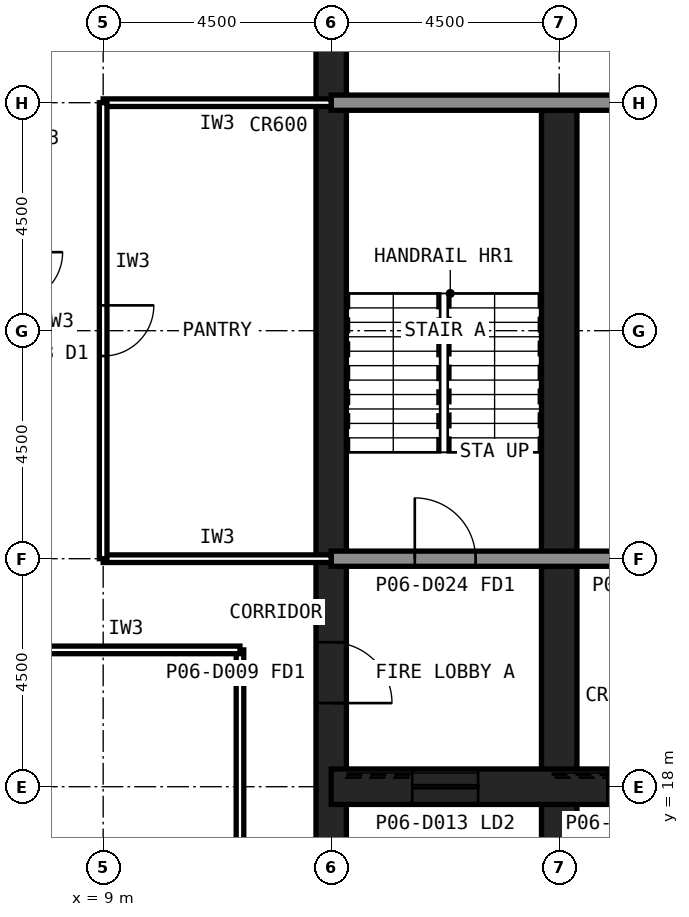
"""IFC4 building model, lengths in metres.
Left out: names, types, materials, properties, quantities, classifications, styles, units other than length and angle.
Written with IfcOpenShell. Run it as: python <this file> out.ifc"""

import sys

from ifc_helpers import new_model, si_unit, direction, frame, frame_2d, origin, place, context, subcontext, project, spatial, rectangle, extrude, element, fill, save


model = new_model("IFC4")
c1 = context("Model", 3, precision=1e-05, world=origin(), true_north=direction((0.0, 1.0)))
c2 = subcontext(c1, "Body", "Model", "MODEL_VIEW")
j1 = project(units=[si_unit("LENGTHUNIT", "METRE"), si_unit("PLANEANGLEUNIT", "RADIAN")], contexts=[c1])
p1 = place(None, origin())
s1 = spatial("IfcSite", under=j1, at=p1, CompositionType="ELEMENT")
p2 = place(p1, origin())
s2 = spatial("IfcBuilding", under=s1, at=p2, CompositionType="ELEMENT")
p3 = place(p2, frame((0.0, 0.0, 29.0)))
s3 = spatial("IfcBuildingStorey", under=s2, at=p3, CompositionType="ELEMENT", Elevation=29.0)
p4 = place(p3, frame((13.5, 40.5, 0.0), z_axis=(0.0, 0.0, 1.0), x_axis=(0.0, -1.0, 0.0)))
e1 = element("IfcWall", 1, at=p4, inside=s3, PredefinedType="SHEAR", context=c2, shape_type="SweptSolid", body=[
    extrude(rectangle(XDim=27.0, YDim=0.6, at=frame_2d((13.5, 0.0))), origin(), (0.0, 0.0, 1.0), 4.2),
])
p5 = place(p4, frame((19.65, 0.0, 0.0)))
e2 = element("IfcOpeningElement", 2, at=p5, cuts=e1, PredefinedType="OPENING", context=c2, shape_type="SweptSolid", body=[
    extrude(rectangle(XDim=1.2, YDim=2.1, at=frame_2d((0.6, 1.05))), frame((0.0, 0.31, 0.0), z_axis=(0.0, -1.0, 0.0), x_axis=(1.0, 0.0, 0.0)), (0.0, 0.0, 1.0), 0.62),
])
p6 = place(p4, frame((5.85, 0.0, 0.0)))
e3 = element("IfcOpeningElement", 3, at=p6, cuts=e1, PredefinedType="OPENING", context=c2, shape_type="SweptSolid", body=[
    extrude(rectangle(XDim=1.8, YDim=2.1, at=frame_2d((0.9, 1.05))), frame((0.0, 0.31, 0.0), z_axis=(0.0, -1.0, 0.0), x_axis=(1.0, 0.0, 0.0)), (0.0, 0.0, 1.0), 0.62),
])
p7 = place(p3, frame((18.0, 13.5, 0.0), z_axis=(0.0, 0.0, 1.0), x_axis=(0.0, 1.0, 0.0)))
e4 = element("IfcWall", 4, at=p7, inside=s3, PredefinedType="SHEAR", context=c2, shape_type="SweptSolid", body=[
    extrude(rectangle(XDim=18.0, YDim=0.7, at=frame_2d((9.0, 0.0))), origin(), (0.0, 0.0, 1.0), 4.2),
])
p8 = place(p3, frame((13.5, 18.0, 0.0), z_axis=(0.0, 0.0, 1.0), x_axis=(1.0, 0.0, 0.0)))
e5 = element("IfcWall", 5, at=p8, inside=s3, PredefinedType="SHEAR", context=c2, shape_type="SweptSolid", body=[
    extrude(rectangle(XDim=27.0, YDim=0.7, at=frame_2d((13.5, 0.0))), origin(), (0.0, 0.0, 1.0), 4.2),
])
p9 = place(p8, frame((24.3, 0.0, 0.0)))
e6 = element("IfcOpeningElement", 6, at=p9, cuts=e5, PredefinedType="OPENING", context=c2, shape_type="SweptSolid", body=[
    extrude(rectangle(XDim=0.9, YDim=2.1, at=frame_2d((0.45, 1.05))), frame((0.0, 0.36, 0.0), z_axis=(0.0, -1.0, 0.0), x_axis=(1.0, 0.0, 0.0)), (0.0, 0.0, 1.0), 0.72),
])
p10 = place(p8, frame((5.45, 0.0, 0.0)))
e7 = element("IfcOpeningElement", 7, at=p10, cuts=e5, PredefinedType="OPENING", context=c2, shape_type="SweptSolid", body=[
    extrude(rectangle(XDim=1.1, YDim=2.1, at=frame_2d((0.55, 1.05))), frame((0.0, 0.36, 0.0), z_axis=(0.0, -1.0, 0.0), x_axis=(1.0, 0.0, 0.0)), (0.0, 0.0, 1.0), 0.72),
])
p11 = place(p8, frame((8.45, 0.0, 0.0)))
e8 = element("IfcOpeningElement", 8, at=p11, cuts=e5, PredefinedType="OPENING", context=c2, shape_type="SweptSolid", body=[
    extrude(rectangle(XDim=1.1, YDim=2.1, at=frame_2d((0.55, 1.05))), frame((0.0, 0.36, 0.0), z_axis=(0.0, -1.0, 0.0), x_axis=(1.0, 0.0, 0.0)), (0.0, 0.0, 1.0), 0.72),
])
p12 = place(p8, frame((11.45, 0.0, 0.0)))
e9 = element("IfcOpeningElement", 9, at=p12, cuts=e5, PredefinedType="OPENING", context=c2, shape_type="SweptSolid", body=[
    extrude(rectangle(XDim=1.1, YDim=2.1, at=frame_2d((0.55, 1.05))), frame((0.0, 0.36, 0.0), z_axis=(0.0, -1.0, 0.0), x_axis=(1.0, 0.0, 0.0)), (0.0, 0.0, 1.0), 0.72),
])
p13 = place(p8, frame((14.45, 0.0, 0.0)))
e10 = element("IfcOpeningElement", 10, at=p13, cuts=e5, PredefinedType="OPENING", context=c2, shape_type="SweptSolid", body=[
    extrude(rectangle(XDim=1.1, YDim=2.1, at=frame_2d((0.55, 1.05))), frame((0.0, 0.36, 0.0), z_axis=(0.0, -1.0, 0.0), x_axis=(1.0, 0.0, 0.0)), (0.0, 0.0, 1.0), 0.72),
])
p14 = place(p8, frame((17.45, 0.0, 0.0)))
e11 = element("IfcOpeningElement", 11, at=p14, cuts=e5, PredefinedType="OPENING", context=c2, shape_type="SweptSolid", body=[
    extrude(rectangle(XDim=1.1, YDim=2.1, at=frame_2d((0.55, 1.05))), frame((0.0, 0.36, 0.0), z_axis=(0.0, -1.0, 0.0), x_axis=(1.0, 0.0, 0.0)), (0.0, 0.0, 1.0), 0.72),
])
p15 = place(p8, frame((20.45, 0.0, 0.0)))
e12 = element("IfcOpeningElement", 12, at=p15, cuts=e5, PredefinedType="OPENING", context=c2, shape_type="SweptSolid", body=[
    extrude(rectangle(XDim=1.1, YDim=2.1, at=frame_2d((0.55, 1.05))), frame((0.0, 0.36, 0.0), z_axis=(0.0, -1.0, 0.0), x_axis=(1.0, 0.0, 0.0)), (0.0, 0.0, 1.0), 0.72),
])
p16 = place(p8, frame((1.6, 0.0, 0.0)))
e13 = element("IfcOpeningElement", 13, at=p16, cuts=e5, PredefinedType="OPENING", context=c2, shape_type="SweptSolid", body=[
    extrude(rectangle(XDim=1.3, YDim=2.2, at=frame_2d((0.65, 1.1))), frame((0.0, 0.36, 0.0), z_axis=(0.0, -1.0, 0.0), x_axis=(1.0, 0.0, 0.0)), (0.0, 0.0, 1.0), 0.72),
])
p17 = place(p3, frame((13.5, 22.5, 0.0), z_axis=(0.0, 0.0, 1.0), x_axis=(1.0, 0.0, 0.0)))
e14 = element("IfcWall", 14, at=p17, inside=s3, PredefinedType="SOLIDWALL", context=c2, shape_type="SweptSolid", body=[
    extrude(rectangle(XDim=27.0, YDim=0.3, at=frame_2d((13.5, 0.0))), origin(), (0.0, 0.0, 1.0), 4.04),
])
p18 = place(p17, frame((1.65, 0.0, 0.0)))
e15 = element("IfcOpeningElement", 15, at=p18, cuts=e14, PredefinedType="OPENING", context=c2, shape_type="SweptSolid", body=[
    extrude(rectangle(XDim=1.2, YDim=2.1, at=frame_2d((0.6, 1.05))), frame((0.0, 0.16, 0.0), z_axis=(0.0, -1.0, 0.0), x_axis=(1.0, 0.0, 0.0)), (0.0, 0.0, 1.0), 0.32),
])
p19 = place(p17, frame((6.025, 0.0, 0.0)))
e16 = element("IfcOpeningElement", 16, at=p19, cuts=e14, PredefinedType="OPENING", context=c2, shape_type="SweptSolid", body=[
    extrude(rectangle(XDim=1.0, YDim=2.1, at=frame_2d((0.5, 1.05))), frame((0.0, 0.16, 0.0), z_axis=(0.0, -1.0, 0.0), x_axis=(1.0, 0.0, 0.0)), (0.0, 0.0, 1.0), 0.32),
])
p20 = place(p17, frame((10.525, 0.0, 0.0)))
e17 = element("IfcOpeningElement", 17, at=p20, cuts=e14, PredefinedType="OPENING", context=c2, shape_type="SweptSolid", body=[
    extrude(rectangle(XDim=1.0, YDim=2.1, at=frame_2d((0.5, 1.05))), frame((0.0, 0.16, 0.0), z_axis=(0.0, -1.0, 0.0), x_axis=(1.0, 0.0, 0.0)), (0.0, 0.0, 1.0), 0.32),
])
p21 = place(p17, frame((19.75, 0.0, 0.0)))
e18 = element("IfcOpeningElement", 18, at=p21, cuts=e14, PredefinedType="OPENING", context=c2, shape_type="SweptSolid", body=[
    extrude(rectangle(XDim=1.0, YDim=2.1, at=frame_2d((0.5, 1.05))), frame((0.0, 0.16, 0.0), z_axis=(0.0, -1.0, 0.0), x_axis=(1.0, 0.0, 0.0)), (0.0, 0.0, 1.0), 0.32),
])
p22 = place(p17, frame((15.05, 0.0, 0.0)))
e19 = element("IfcOpeningElement", 19, at=p22, cuts=e14, PredefinedType="OPENING", context=c2, shape_type="SweptSolid", body=[
    extrude(rectangle(XDim=1.4, YDim=2.4, at=frame_2d((0.7, 1.2))), frame((0.0, 0.16, 0.0), z_axis=(0.0, -1.0, 0.0), x_axis=(1.0, 0.0, 0.0)), (0.0, 0.0, 1.0), 0.32),
])
p23 = place(p3, frame((13.5, 31.5, 0.0), z_axis=(0.0, 0.0, 1.0), x_axis=(1.0, 0.0, 0.0)))
e20 = element("IfcWall", 20, at=p23, inside=s3, PredefinedType="SOLIDWALL", context=c2, shape_type="SweptSolid", body=[
    extrude(rectangle(XDim=27.0, YDim=0.3, at=frame_2d((13.5, 0.0))), origin(), (0.0, 0.0, 1.0), 4.04),
])
p24 = place(p23, frame((24.15, 0.0, 0.0)))
e21 = element("IfcOpeningElement", 21, at=p24, cuts=e20, PredefinedType="OPENING", context=c2, shape_type="SweptSolid", body=[
    extrude(rectangle(XDim=1.2, YDim=2.1, at=frame_2d((0.6, 1.05))), frame((0.0, 0.16, 0.0), z_axis=(0.0, -1.0, 0.0), x_axis=(1.0, 0.0, 0.0)), (0.0, 0.0, 1.0), 0.32),
])
p25 = place(p23, frame((15.3, 0.0, 0.0)))
e22 = element("IfcOpeningElement", 22, at=p25, cuts=e20, PredefinedType="OPENING", context=c2, shape_type="SweptSolid", body=[
    extrude(rectangle(XDim=0.9, YDim=2.1, at=frame_2d((0.45, 1.05))), frame((0.0, 0.16, 0.0), z_axis=(0.0, -1.0, 0.0), x_axis=(1.0, 0.0, 0.0)), (0.0, 0.0, 1.0), 0.32),
])
p26 = place(p23, frame((19.8, 0.0, 0.0)))
e23 = element("IfcOpeningElement", 23, at=p26, cuts=e20, PredefinedType="OPENING", context=c2, shape_type="SweptSolid", body=[
    extrude(rectangle(XDim=0.9, YDim=2.1, at=frame_2d((0.45, 1.05))), frame((0.0, 0.16, 0.0), z_axis=(0.0, -1.0, 0.0), x_axis=(1.0, 0.0, 0.0)), (0.0, 0.0, 1.0), 0.32),
])
p27 = place(p3, frame((11.7, 20.7, 0.0), z_axis=(0.0, 0.0, 1.0), x_axis=(0.0, -1.0, 0.0)))
e24 = element("IfcWall", 24, at=p27, inside=s3, PredefinedType="PARTITIONING", context=c2, shape_type="SweptSolid", body=[
    extrude(rectangle(XDim=9.0, YDim=0.15, at=frame_2d((4.5, 0.0))), origin(), (0.0, 0.0, 1.0), 4.04),
])
p28 = place(p3, frame((7.2, 20.7, 0.0), z_axis=(0.0, 0.0, 1.0), x_axis=(1.0, 0.0, 0.0)))
e25 = element("IfcWall", 25, at=p28, inside=s3, PredefinedType="PARTITIONING", context=c2, shape_type="SweptSolid", body=[
    extrude(rectangle(XDim=4.5, YDim=0.15, at=frame_2d((2.25, 0.0))), origin(), (0.0, 0.0, 1.0), 4.04),
])
for number, where, z_axis, x_axis in (
    (26, (9.0, 22.5, 0.0), (0.0, 0.0, 1.0), (1.0, 0.0, 0.0)),
    (27, (13.5, 31.5, 0.0), (0.0, 0.0, 1.0), (-1.0, 0.0, 0.0)),
):
    element("IfcWall", number, at=place(p3, frame(where, z_axis=z_axis, x_axis=x_axis)), inside=s3, PredefinedType="PARTITIONING", context=c2, shape_type="SweptSolid", body=[
        extrude(rectangle(XDim=4.5, YDim=0.15, at=frame_2d((2.25, 0.0))), origin(), (0.0, 0.0, 1.0), 3.189),
    ])
p29 = place(p3, frame((9.0, 31.5, 0.0), z_axis=(0.0, 0.0, 1.0), x_axis=(0.0, -1.0, 0.0)))
e28 = element("IfcWall", 28, at=p29, inside=s3, PredefinedType="PARTITIONING", context=c2, shape_type="SweptSolid", body=[
    extrude(rectangle(XDim=9.0, YDim=0.15, at=frame_2d((4.5, 0.0))), origin(), (0.0, 0.0, 1.0), 4.04),
])
p30 = place(p29, frame((4.0, 0.0, 0.0)))
e29 = element("IfcOpeningElement", 29, at=p30, cuts=e28, PredefinedType="OPENING", context=c2, shape_type="SweptSolid", body=[
    extrude(rectangle(XDim=1.0, YDim=2.1, at=frame_2d((0.5, 1.05))), frame((0.0, 0.085, 0.0), z_axis=(0.0, -1.0, 0.0), x_axis=(1.0, 0.0, 0.0)), (0.0, 0.0, 1.0), 0.17),
])
p31 = place(p5, origin())
e30 = element("IfcDoor", 30, at=p31, inside=s3, OperationType="SINGLE_SWING_RIGHT", PredefinedType="DOOR", context=c2, shape_type="SweptSolid", body=[
    extrude(rectangle(XDim=1.2, YDim=2.1, at=frame_2d((0.6, 1.05))), frame((0.0, 0.025, 0.0), z_axis=(0.0, -1.0, 0.0), x_axis=(1.0, 0.0, 0.0)), (0.0, 0.0, 1.0), 0.05),
])
fill(e2, e30)
p32 = place(p18, origin())
e31 = element("IfcDoor", 31, at=p32, inside=s3, OperationType="SINGLE_SWING_LEFT", PredefinedType="DOOR", context=c2, shape_type="SweptSolid", body=[
    extrude(rectangle(XDim=1.2, YDim=2.1, at=frame_2d((0.6, 1.05))), frame((0.0, 0.025, 0.0), z_axis=(0.0, -1.0, 0.0), x_axis=(1.0, 0.0, 0.0)), (0.0, 0.0, 1.0), 0.05),
])
fill(e15, e31)
p33 = place(p10, origin())
e32 = element("IfcDoor", 32, at=p33, inside=s3, OperationType="SLIDING_TO_LEFT", PredefinedType="DOOR", context=c2, shape_type="SweptSolid", body=[
    extrude(rectangle(XDim=1.1, YDim=2.1, at=frame_2d((0.55, 1.05))), frame((0.0, 0.025, 0.0), z_axis=(0.0, -1.0, 0.0), x_axis=(1.0, 0.0, 0.0)), (0.0, 0.0, 1.0), 0.05),
])
fill(e7, e32)
p34 = place(p16, origin())
e33 = element("IfcDoor", 33, at=p34, inside=s3, OperationType="SLIDING_TO_LEFT", PredefinedType="DOOR", context=c2, shape_type="SweptSolid", body=[
    extrude(rectangle(XDim=1.3, YDim=2.2, at=frame_2d((0.65, 1.1))), frame((0.0, 0.025, 0.0), z_axis=(0.0, -1.0, 0.0), x_axis=(1.0, 0.0, 0.0)), (0.0, 0.0, 1.0), 0.05),
])
fill(e13, e33)
p35 = place(p30, origin())
e34 = element("IfcDoor", 34, at=p35, inside=s3, OperationType="SINGLE_SWING_LEFT", PredefinedType="DOOR", context=c2, shape_type="SweptSolid", body=[
    extrude(rectangle(XDim=1.0, YDim=2.1, at=frame_2d((0.5, 1.05))), frame((0.0, 0.025, 0.0), z_axis=(0.0, -1.0, 0.0), x_axis=(1.0, 0.0, 0.0)), (0.0, 0.0, 1.0), 0.05),
])
fill(e29, e34)
save(model, sys.argv[1])
